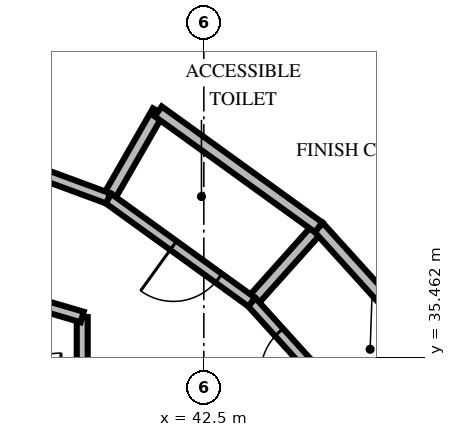
"""IFC4 building model, lengths in metres.
Left out: names, types, materials, properties, quantities, classifications, styles, units other than length and angle.
Written with IfcOpenShell. Run it as: python <this file> out.ifc"""

import sys

from ifc_helpers import new_model, si_unit, direction, frame, frame_2d, origin, place, context, subcontext, project, spatial, rectangle, extrude, element, fill, save


model = new_model("IFC4")
c1 = context("Model", 3, precision=1e-05, world=origin(), true_north=direction((0.0, 1.0)))
c2 = subcontext(c1, "Body", "Model", "MODEL_VIEW")
j1 = project(units=[si_unit("LENGTHUNIT", "METRE"), si_unit("PLANEANGLEUNIT", "RADIAN")], contexts=[c1])
p1 = place(None, origin())
s1 = spatial("IfcSite", under=j1, at=p1, CompositionType="ELEMENT")
p2 = place(p1, origin())
s2 = spatial("IfcBuilding", under=s1, at=p2, CompositionType="ELEMENT")
p3 = place(p2, frame((0.0, 0.0, 101.8)))
s3 = spatial("IfcBuildingStorey", under=s2, at=p3, CompositionType="ELEMENT", Elevation=101.8)
p4 = place(p3, frame((40.5, 36.123, 0.0), z_axis=(0.0, 0.0, 1.0), x_axis=(0.0, -1.0, 0.0)))
e1 = element("IfcWall", 1, at=p4, inside=s3, PredefinedType="PARTITIONING", context=c2, shape_type="SweptSolid", body=[
    extrude(rectangle(XDim=1.693, YDim=0.18, at=frame_2d((0.846, 0.0))), origin(), (0.0, 0.0, 1.0), 2.8),
])
p5 = place(p3, frame((34.0, 38.03, 0.0), z_axis=(0.0, 0.0, 1.0), x_axis=(0.959546654541, -0.281549671923, 0.0)))
e2 = element("IfcWall", 2, at=p5, inside=s3, PredefinedType="PARTITIONING", context=c2, shape_type="SweptSolid", body=[
    extrude(rectangle(XDim=6.774, YDim=0.18, at=frame_2d((3.387, 0.0))), origin(), (0.0, 0.0, 1.0), 2.8),
])
p6 = place(p5, frame((2.837, 0.0, 0.0)))
e3 = element("IfcOpeningElement", 3, at=p6, cuts=e2, PredefinedType="OPENING", context=c2, shape_type="SweptSolid", body=[
    extrude(rectangle(XDim=1.1, YDim=2.15, at=frame_2d((0.55, 1.075))), frame((0.0, 0.1, 0.0), z_axis=(0.0, -1.0, 0.0), x_axis=(1.0, 0.0, 0.0)), (0.0, 0.0, 1.0), 0.2),
])
p7 = place(p3, frame((43.287, 36.369, 0.0), z_axis=(0.0, 0.0, 1.0), x_axis=(0.667197013262, 0.744881296244, 0.0)))
e4 = element("IfcWall", 4, at=p7, inside=s3, PredefinedType="PLUMBINGWALL", context=c2, shape_type="SweptSolid", body=[
    extrude(rectangle(XDim=1.65, YDim=0.2, at=frame_2d((0.825, 0.0))), origin(), (0.0, 0.0, 1.0), 2.8),
])
p8 = place(p3, frame((46.573, 35.185, 0.0), z_axis=(0.0, 0.0, 1.0), x_axis=(-0.671133255477, 0.741336734145, 0.0)))
e5 = element("IfcWall", 5, at=p8, inside=s3, PredefinedType="PLUMBINGWALL", context=c2, shape_type="SweptSolid", body=[
    extrude(rectangle(XDim=3.255, YDim=0.2, at=frame_2d((1.627, 0.0))), origin(), (0.0, 0.0, 1.0), 2.8),
])
p9 = place(p3, frame((45.24, 34.211, 0.0), z_axis=(0.0, 0.0, 1.0), x_axis=(-0.671080261141, 0.741384706551, 0.0)))
e6 = element("IfcWall", 6, at=p9, inside=s3, PredefinedType="PARTITIONING", context=c2, shape_type="SweptSolid", body=[
    extrude(rectangle(XDim=2.91, YDim=0.18, at=frame_2d((1.455, 0.0))), origin(), (0.0, 0.0, 1.0), 2.8),
])
p10 = place(p9, frame((1.321, 0.0, 0.0)))
e7 = element("IfcOpeningElement", 7, at=p10, cuts=e6, PredefinedType="OPENING", context=c2, shape_type="SweptSolid", body=[
    extrude(rectangle(XDim=0.92, YDim=2.1, at=frame_2d((0.46, 1.05))), frame((0.0, 0.1, 0.0), z_axis=(0.0, -1.0, 0.0), x_axis=(1.0, 0.0, 0.0)), (0.0, 0.0, 1.0), 0.2),
])
p11 = place(p3, frame((40.928, 38.073, 0.0), z_axis=(0.0, 0.0, 1.0), x_axis=(0.497731499238, 0.867331167817, 0.0)))
e8 = element("IfcWall", 8, at=p11, inside=s3, PredefinedType="PLUMBINGWALL", context=c2, shape_type="SweptSolid", body=[
    extrude(rectangle(XDim=1.65, YDim=0.2, at=frame_2d((0.825, 0.0))), origin(), (0.0, 0.0, 1.0), 2.8),
])
p12 = place(p3, frame((44.388, 37.598, 0.0), z_axis=(0.0, 0.0, 1.0), x_axis=(-0.810513057076, 0.585720568453, 0.0)))
e9 = element("IfcWall", 9, at=p12, inside=s3, PredefinedType="PLUMBINGWALL", context=c2, shape_type="SweptSolid", body=[
    extrude(rectangle(XDim=3.255, YDim=0.2, at=frame_2d((1.627, 0.0))), origin(), (0.0, 0.0, 1.0), 2.8),
])
p13 = place(p3, frame((43.287, 36.369, 0.0), z_axis=(0.0, 0.0, 1.0), x_axis=(-0.81053540368, 0.585689644249, 0.0)))
e10 = element("IfcWall", 10, at=p13, inside=s3, PredefinedType="PARTITIONING", context=c2, shape_type="SweptSolid", body=[
    extrude(rectangle(XDim=2.91, YDim=0.18, at=frame_2d((1.455, 0.0))), origin(), (0.0, 0.0, 1.0), 2.8),
])
p14 = place(p13, frame((0.669, 0.0, 0.0)))
e11 = element("IfcOpeningElement", 11, at=p14, cuts=e10, PredefinedType="OPENING", context=c2, shape_type="SweptSolid", body=[
    extrude(rectangle(XDim=0.92, YDim=2.1, at=frame_2d((0.46, 1.05))), frame((0.0, 0.1, 0.0), z_axis=(0.0, -1.0, 0.0), x_axis=(1.0, 0.0, 0.0)), (0.0, 0.0, 1.0), 0.2),
])
p15 = place(p3, frame((40.928, 38.073, 0.0), z_axis=(0.0, 0.0, 1.0), x_axis=(-0.93819579776, 0.346104962496, 0.0)))
e12 = element("IfcWall", 12, at=p15, inside=s3, PredefinedType="PARTITIONING", context=c2, shape_type="SweptSolid", body=[
    extrude(rectangle(XDim=4.643, YDim=0.18, at=frame_2d((2.321, 0.0))), origin(), (0.0, 0.0, 1.0), 2.8),
])
p16 = place(p10, origin())
e13 = element("IfcDoor", 13, at=p16, inside=s3, OperationType="SINGLE_SWING_LEFT", PredefinedType="DOOR", context=c2, shape_type="SweptSolid", body=[
    extrude(rectangle(XDim=0.92, YDim=2.1, at=frame_2d((0.46, 1.05))), frame((0.0, 0.025, 0.0), z_axis=(0.0, -1.0, 0.0), x_axis=(1.0, 0.0, 0.0)), (0.0, 0.0, 1.0), 0.05),
])
fill(e7, e13)
p17 = place(p14, origin())
e14 = element("IfcDoor", 14, at=p17, inside=s3, OperationType="SINGLE_SWING_RIGHT", PredefinedType="DOOR", context=c2, shape_type="SweptSolid", body=[
    extrude(rectangle(XDim=0.92, YDim=2.1, at=frame_2d((0.46, 1.05))), frame((0.0, 0.025, 0.0), z_axis=(0.0, -1.0, 0.0), x_axis=(1.0, 0.0, 0.0)), (0.0, 0.0, 1.0), 0.05),
])
fill(e11, e14)
save(model, sys.argv[1])
